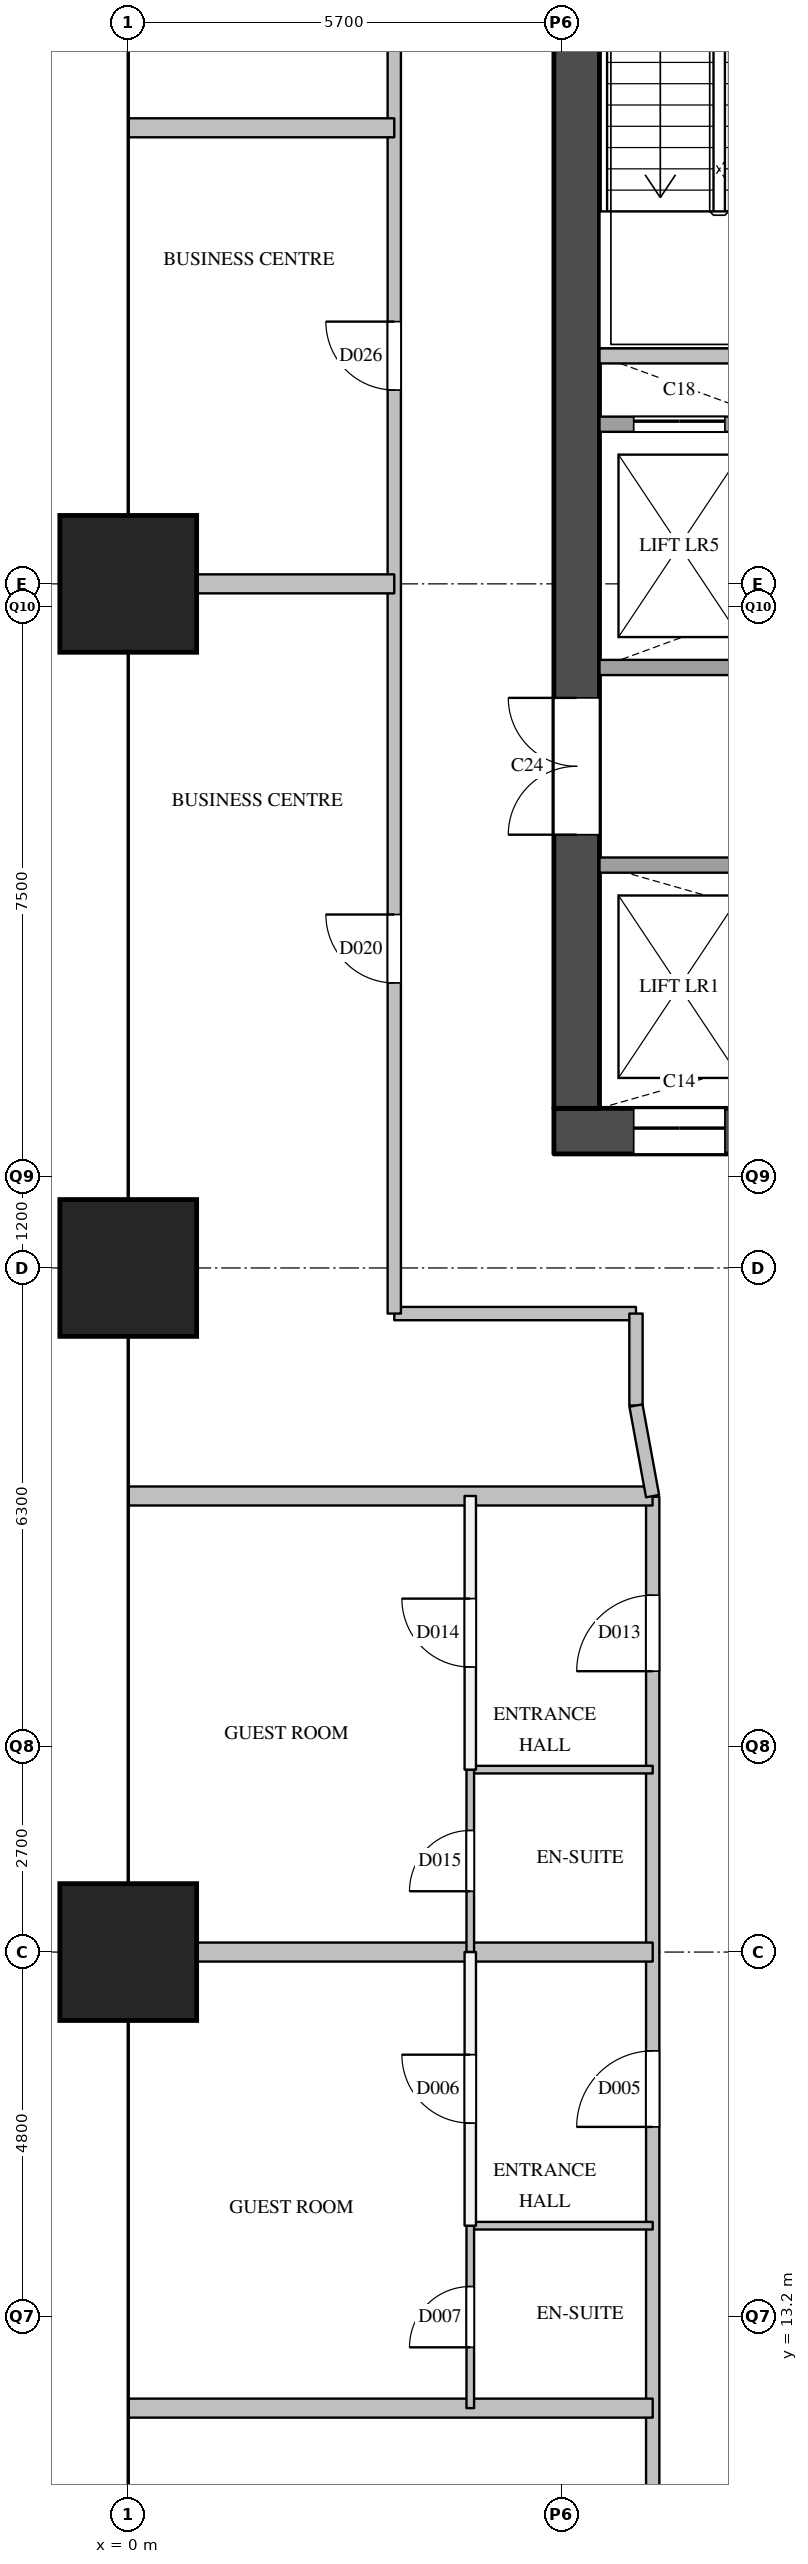
"""IFC4 building model, lengths in metres.
Left out: names, types, materials, properties, quantities, classifications, styles, units other than length and angle.
Written with IfcOpenShell. Run it as: python <this file> out.ifc"""

import sys

from ifc_helpers import new_model, si_unit, direction, frame, frame_2d, origin, origin_2d, place, context, subcontext, project, spatial, rectangle, extrude, element, fill, save


model = new_model("IFC4")
c1 = context("Model", 3, precision=1e-05, world=origin(), true_north=direction((0.0, 1.0)))
c2 = subcontext(c1, "Body", "Model", "MODEL_VIEW")
j1 = project(units=[si_unit("LENGTHUNIT", "METRE"), si_unit("PLANEANGLEUNIT", "RADIAN")], contexts=[c1])
p1 = place(None, origin())
s1 = spatial("IfcSite", under=j1, at=p1, CompositionType="ELEMENT")
p2 = place(p1, origin())
s2 = spatial("IfcBuilding", under=s1, at=p2, CompositionType="ELEMENT")
p3 = place(p2, frame((0.0, 0.0, 46.2)))
s3 = spatial("IfcBuildingStorey", under=s2, at=p3, CompositionType="ELEMENT", Elevation=46.2)
for number, where, z_axis, x_axis in (
    (1, (0.0, 18.0, 0.0), (0.0, 0.0, 1.0), (1.0, 0.0, 0.0)),
    (2, (0.0, 27.0, 0.0), (0.0, 0.0, 1.0), (1.0, 0.0, 0.0)),
    (3, (0.0, 36.0, 0.0), (0.0, 0.0, 1.0), (1.0, 0.0, 0.0)),
):
    element("IfcColumn", number, at=place(p3, frame(where, z_axis=z_axis, x_axis=x_axis)), inside=s3, PredefinedType="COLUMN", context=c2, shape_type="SweptSolid", body=[
        extrude(rectangle(XDim=1.8, YDim=1.8, at=origin_2d()), origin(), (0.0, 0.0, 1.0), 3.8),
    ])
p4 = place(p3, frame((5.6, 28.8, 0.0), z_axis=(0.0, 0.0, 1.0), x_axis=(1.0, 0.0, 0.0)))
e4 = element("IfcWall", 4, at=p4, inside=s3, PredefinedType="SHEAR", context=c2, shape_type="SweptSolid", body=[
    extrude(rectangle(XDim=12.4, YDim=0.6, at=frame_2d((6.2, 0.0))), origin(), (0.0, 0.0, 1.0), 3.5),
])
p5 = place(p4, frame((1.05, 0.0, 0.0)))
e5 = element("IfcOpeningElement", 5, at=p5, cuts=e4, PredefinedType="OPENING", context=c2, shape_type="SweptSolid", body=[
    extrude(rectangle(XDim=1.2, YDim=2.1, at=frame_2d((0.6, 1.05))), frame((0.0, 0.31, 0.0), z_axis=(0.0, -1.0, 0.0), x_axis=(1.0, 0.0, 0.0)), (0.0, 0.0, 1.0), 0.62),
])
p6 = place(p4, frame((5.25, 0.0, 0.0)))
e6 = element("IfcOpeningElement", 6, at=p6, cuts=e4, PredefinedType="OPENING", context=c2, shape_type="SweptSolid", body=[
    extrude(rectangle(XDim=1.2, YDim=2.1, at=frame_2d((0.6, 1.05))), frame((0.0, 0.31, 0.0), z_axis=(0.0, -1.0, 0.0), x_axis=(1.0, 0.0, 0.0)), (0.0, 0.0, 1.0), 0.62),
])
p7 = place(p4, frame((7.35, 0.0, 0.0)))
e7 = element("IfcOpeningElement", 7, at=p7, cuts=e4, PredefinedType="OPENING", context=c2, shape_type="SweptSolid", body=[
    extrude(rectangle(XDim=1.2, YDim=2.1, at=frame_2d((0.6, 1.05))), frame((0.0, 0.31, 0.0), z_axis=(0.0, -1.0, 0.0), x_axis=(1.0, 0.0, 0.0)), (0.0, 0.0, 1.0), 0.62),
])
p8 = place(p3, frame((5.9, 29.1, 0.0), z_axis=(0.0, 0.0, 1.0), x_axis=(0.0, 1.0, 0.0)))
e8 = element("IfcWall", 8, at=p8, inside=s3, PredefinedType="SHEAR", context=c2, shape_type="SweptSolid", body=[
    extrude(rectangle(XDim=20.3, YDim=0.6, at=frame_2d((10.15, 0.0))), origin(), (0.0, 0.0, 1.0), 3.5),
])
p9 = place(p8, frame((3.6, 0.0, 0.0)))
e9 = element("IfcOpeningElement", 9, at=p9, cuts=e8, PredefinedType="OPENING", context=c2, shape_type="SweptSolid", body=[
    extrude(rectangle(XDim=1.8, YDim=2.1, at=frame_2d((0.9, 1.05))), frame((0.0, 0.31, 0.0), z_axis=(0.0, -1.0, 0.0), x_axis=(1.0, 0.0, 0.0)), (0.0, 0.0, 1.0), 0.62),
])
p10 = place(p8, frame((16.4, 0.0, 0.0)))
e10 = element("IfcOpeningElement", 10, at=p10, cuts=e8, PredefinedType="OPENING", context=c2, shape_type="SweptSolid", body=[
    extrude(rectangle(XDim=1.0, YDim=2.1, at=frame_2d((0.5, 1.05))), frame((0.0, 0.31, 0.0), z_axis=(0.0, -1.0, 0.0), x_axis=(1.0, 0.0, 0.0)), (0.0, 0.0, 1.0), 0.62),
])
p11 = place(p3, frame((6.2, 32.3, 0.0), z_axis=(0.0, 0.0, 1.0), x_axis=(1.0, 0.0, 0.0)))
e11 = element("IfcWall", 11, at=p11, inside=s3, PredefinedType="SOLIDWALL", context=c2, shape_type="SweptSolid", body=[
    extrude(rectangle(XDim=11.2, YDim=0.2, at=frame_2d((5.6, 0.0))), origin(), (0.0, 0.0, 1.0), 3.5),
])
p12 = place(p11, frame((2.55, 0.0, 0.0)))
e12 = element("IfcOpeningElement", 12, at=p12, cuts=e11, PredefinedType="OPENING", context=c2, shape_type="SweptSolid", body=[
    extrude(rectangle(XDim=1.2, YDim=2.1, at=frame_2d((0.6, 1.05))), frame((0.0, 0.11, 0.0), z_axis=(0.0, -1.0, 0.0), x_axis=(1.0, 0.0, 0.0)), (0.0, 0.0, 1.0), 0.22),
])
p13 = place(p3, frame((6.2, 34.9, 0.0), z_axis=(0.0, 0.0, 1.0), x_axis=(1.0, 0.0, 0.0)))
e13 = element("IfcWall", 13, at=p13, inside=s3, PredefinedType="SOLIDWALL", context=c2, shape_type="SweptSolid", body=[
    extrude(rectangle(XDim=11.2, YDim=0.2, at=frame_2d((5.6, 0.0))), origin(), (0.0, 0.0, 1.0), 3.5),
])
p14 = place(p3, frame((6.2, 38.1, 0.0), z_axis=(0.0, 0.0, 1.0), x_axis=(1.0, 0.0, 0.0)))
e14 = element("IfcWall", 14, at=p14, inside=s3, PredefinedType="SOLIDWALL", context=c2, shape_type="SweptSolid", body=[
    extrude(rectangle(XDim=11.2, YDim=0.2, at=frame_2d((5.6, 0.0))), origin(), (0.0, 0.0, 1.0), 3.5),
])
p15 = place(p14, frame((0.45, 0.0, 0.0)))
e15 = element("IfcOpeningElement", 15, at=p15, cuts=e14, PredefinedType="OPENING", context=c2, shape_type="SweptSolid", body=[
    extrude(rectangle(XDim=1.2, YDim=2.1, at=frame_2d((0.6, 1.05))), frame((0.0, 0.11, 0.0), z_axis=(0.0, -1.0, 0.0), x_axis=(1.0, 0.0, 0.0)), (0.0, 0.0, 1.0), 0.22),
])
p16 = place(p14, frame((2.55, 0.0, 0.0)))
e16 = element("IfcOpeningElement", 16, at=p16, cuts=e14, PredefinedType="OPENING", context=c2, shape_type="SweptSolid", body=[
    extrude(rectangle(XDim=1.2, YDim=2.1, at=frame_2d((0.6, 1.05))), frame((0.0, 0.11, 0.0), z_axis=(0.0, -1.0, 0.0), x_axis=(1.0, 0.0, 0.0)), (0.0, 0.0, 1.0), 0.22),
])
p17 = place(p14, frame((4.65, 0.0, 0.0)))
e17 = element("IfcOpeningElement", 17, at=p17, cuts=e14, PredefinedType="OPENING", context=c2, shape_type="SweptSolid", body=[
    extrude(rectangle(XDim=1.2, YDim=2.1, at=frame_2d((0.6, 1.05))), frame((0.0, 0.11, 0.0), z_axis=(0.0, -1.0, 0.0), x_axis=(1.0, 0.0, 0.0)), (0.0, 0.0, 1.0), 0.22),
])
p18 = place(p14, frame((6.75, 0.0, 0.0)))
e18 = element("IfcOpeningElement", 18, at=p18, cuts=e14, PredefinedType="OPENING", context=c2, shape_type="SweptSolid", body=[
    extrude(rectangle(XDim=1.2, YDim=2.1, at=frame_2d((0.6, 1.05))), frame((0.0, 0.11, 0.0), z_axis=(0.0, -1.0, 0.0), x_axis=(1.0, 0.0, 0.0)), (0.0, 0.0, 1.0), 0.22),
])
p19 = place(p3, frame((6.2, 39.0, 0.0), z_axis=(0.0, 0.0, 1.0), x_axis=(1.0, 0.0, 0.0)))
e19 = element("IfcWall", 19, at=p19, inside=s3, PredefinedType="SOLIDWALL", context=c2, shape_type="SweptSolid", body=[
    extrude(rectangle(XDim=3.05, YDim=0.2, at=frame_2d((1.525, 0.0))), origin(), (0.0, 0.0, 1.0), 3.5),
])
p20 = place(p3, frame((3.5, 26.4, 0.0), z_axis=(0.0, 0.0, 1.0), x_axis=(1.0, 0.0, 0.0)))
e20 = element("IfcWall", 20, at=p20, inside=s3, PredefinedType="PARTITIONING", context=c2, shape_type="SweptSolid", body=[
    extrude(rectangle(XDim=3.18, YDim=0.175, at=frame_2d((1.59, 0.0))), origin(), (0.0, 0.0, 1.0), 3.5),
])
p21 = place(p3, frame((3.5, 26.4, 0.0), z_axis=(0.0, 0.0, 1.0), x_axis=(0.0, 1.0, 0.0)))
e21 = element("IfcWall", 21, at=p21, inside=s3, PredefinedType="PARTITIONING", context=c2, shape_type="SweptSolid", body=[
    extrude(rectangle(XDim=25.7, YDim=0.175, at=frame_2d((12.85, 0.0))), origin(), (0.0, 0.0, 1.0), 2.5),
])
p22 = place(p21, frame((4.35, 0.0, 0.0)))
e22 = element("IfcOpeningElement", 22, at=p22, cuts=e21, PredefinedType="OPENING", context=c2, shape_type="SweptSolid", body=[
    extrude(rectangle(XDim=0.9, YDim=2.1, at=frame_2d((0.45, 1.05))), frame((0.0, 0.097, 0.0), z_axis=(0.0, -1.0, 0.0), x_axis=(1.0, 0.0, 0.0)), (0.0, 0.0, 1.0), 0.195),
])
p23 = place(p21, frame((12.15, 0.0, 0.0)))
e23 = element("IfcOpeningElement", 23, at=p23, cuts=e21, PredefinedType="OPENING", context=c2, shape_type="SweptSolid", body=[
    extrude(rectangle(XDim=0.9, YDim=2.1, at=frame_2d((0.45, 1.05))), frame((0.0, 0.097, 0.0), z_axis=(0.0, -1.0, 0.0), x_axis=(1.0, 0.0, 0.0)), (0.0, 0.0, 1.0), 0.195),
])
p24 = place(p21, frame((20.2, 0.0, 0.0)))
e24 = element("IfcOpeningElement", 24, at=p24, cuts=e21, PredefinedType="OPENING", context=c2, shape_type="SweptSolid", body=[
    extrude(rectangle(XDim=0.9, YDim=2.1, at=frame_2d((0.45, 1.05))), frame((0.0, 0.097, 0.0), z_axis=(0.0, -1.0, 0.0), x_axis=(1.0, 0.0, 0.0)), (0.0, 0.0, 1.0), 0.195),
])
p25 = place(p3, frame((6.68, 25.19, 0.0), z_axis=(0.0, 0.0, 1.0), x_axis=(0.0, 1.0, 0.0)))
e25 = element("IfcWall", 25, at=p25, inside=s3, PredefinedType="PARTITIONING", context=c2, shape_type="SweptSolid", body=[
    extrude(rectangle(XDim=1.21, YDim=0.175, at=frame_2d((0.605, 0.0))), origin(), (0.0, 0.0, 1.0), 3.5),
])
p26 = place(p3, frame((6.9, 6.9, 0.0), z_axis=(0.0, 0.0, 1.0), x_axis=(0.0, 1.0, 0.0)))
e26 = element("IfcWall", 26, at=p26, inside=s3, PredefinedType="PARTITIONING", context=c2, shape_type="SweptSolid", body=[
    extrude(rectangle(XDim=17.09, YDim=0.175, at=frame_2d((8.545, 0.0))), origin(), (0.0, 0.0, 1.0), 3.5),
])
p27 = place(p26, frame((8.8, 0.0, 0.0)))
e27 = element("IfcOpeningElement", 27, at=p27, cuts=e26, PredefinedType="OPENING", context=c2, shape_type="SweptSolid", body=[
    extrude(rectangle(XDim=1.0, YDim=2.1, at=frame_2d((0.5, 1.05))), frame((0.0, 0.097, 0.0), z_axis=(0.0, -1.0, 0.0), x_axis=(1.0, 0.0, 0.0)), (0.0, 0.0, 1.0), 0.195),
])
p28 = place(p26, frame((14.795, 0.0, 0.0)))
e28 = element("IfcOpeningElement", 28, at=p28, cuts=e26, PredefinedType="OPENING", context=c2, shape_type="SweptSolid", body=[
    extrude(rectangle(XDim=1.0, YDim=2.1, at=frame_2d((0.5, 1.05))), frame((0.0, 0.097, 0.0), z_axis=(0.0, -1.0, 0.0), x_axis=(1.0, 0.0, 0.0)), (0.0, 0.0, 1.0), 0.195),
])
p29 = place(p3, frame((4.5, 14.4, 0.0), z_axis=(0.0, 0.0, 1.0), x_axis=(0.0, 1.0, 0.0)))
e29 = element("IfcWall", 29, at=p29, inside=s3, PredefinedType="PARTITIONING", context=c2, shape_type="SweptSolid", body=[
    extrude(rectangle(XDim=3.6, YDim=0.15, at=frame_2d((1.8, 0.0))), origin(), (0.0, 0.0, 1.0), 3.5),
])
p30 = place(p29, frame((1.35, 0.0, 0.0)))
e30 = element("IfcOpeningElement", 30, at=p30, cuts=e29, PredefinedType="OPENING", context=c2, shape_type="SweptSolid", body=[
    extrude(rectangle(XDim=0.9, YDim=2.1, at=frame_2d((0.45, 1.05))), frame((0.0, 0.085, 0.0), z_axis=(0.0, -1.0, 0.0), x_axis=(1.0, 0.0, 0.0)), (0.0, 0.0, 1.0), 0.17),
])
p31 = place(p3, frame((4.5, 20.4, 0.0), z_axis=(0.0, 0.0, 1.0), x_axis=(0.0, 1.0, 0.0)))
e31 = element("IfcWall", 31, at=p31, inside=s3, PredefinedType="PARTITIONING", context=c2, shape_type="SweptSolid", body=[
    extrude(rectangle(XDim=3.6, YDim=0.15, at=frame_2d((1.8, 0.0))), origin(), (0.0, 0.0, 1.0), 3.5),
])
p32 = place(p31, frame((1.35, 0.0, 0.0)))
e32 = element("IfcOpeningElement", 32, at=p32, cuts=e31, PredefinedType="OPENING", context=c2, shape_type="SweptSolid", body=[
    extrude(rectangle(XDim=0.9, YDim=2.1, at=frame_2d((0.45, 1.05))), frame((0.0, 0.085, 0.0), z_axis=(0.0, -1.0, 0.0), x_axis=(1.0, 0.0, 0.0)), (0.0, 0.0, 1.0), 0.17),
])
p33 = place(p3, frame((0.0, 12.0, 0.0), z_axis=(0.0, 0.0, 1.0), x_axis=(1.0, 0.0, 0.0)))
e33 = element("IfcWall", 33, at=p33, inside=s3, PredefinedType="PARTITIONING", context=c2, shape_type="SweptSolid", body=[
    extrude(rectangle(XDim=6.9, YDim=0.25, at=frame_2d((3.45, 0.0))), origin(), (0.0, 0.0, 1.0), 2.5),
])
p34 = place(p3, frame((0.0, 18.0, 0.0), z_axis=(0.0, 0.0, 1.0), x_axis=(1.0, 0.0, 0.0)))
e34 = element("IfcWall", 34, at=p34, inside=s3, PredefinedType="PARTITIONING", context=c2, shape_type="SweptSolid", body=[
    extrude(rectangle(XDim=6.9, YDim=0.25, at=frame_2d((3.45, 0.0))), origin(), (0.0, 0.0, 1.0), 3.5),
])
p35 = place(p3, frame((0.0, 24.0, 0.0), z_axis=(0.0, 0.0, 1.0), x_axis=(1.0, 0.0, 0.0)))
e35 = element("IfcWall", 35, at=p35, inside=s3, PredefinedType="PARTITIONING", context=c2, shape_type="SweptSolid", body=[
    extrude(rectangle(XDim=6.898, YDim=0.25, at=frame_2d((3.449, 0.0))), origin(), (0.0, 0.0, 1.0), 2.5),
])
p36 = place(p3, frame((0.0, 36.0, 0.0), z_axis=(0.0, 0.0, 1.0), x_axis=(1.0, 0.0, 0.0)))
e36 = element("IfcWall", 36, at=p36, inside=s3, PredefinedType="PARTITIONING", context=c2, shape_type="SweptSolid", body=[
    extrude(rectangle(XDim=3.5, YDim=0.25, at=frame_2d((1.75, 0.0))), origin(), (0.0, 0.0, 1.0), 3.5),
])
p37 = place(p3, frame((0.0, 42.0, 0.0), z_axis=(0.0, 0.0, 1.0), x_axis=(1.0, 0.0, 0.0)))
e37 = element("IfcWall", 37, at=p37, inside=s3, PredefinedType="PARTITIONING", context=c2, shape_type="SweptSolid", body=[
    extrude(rectangle(XDim=3.5, YDim=0.25, at=frame_2d((1.75, 0.0))), origin(), (0.0, 0.0, 1.0), 2.5),
])
for number, where, z_axis, x_axis in (
    (38, (4.5, 14.4, 0.0), (0.0, 0.0, 1.0), (1.0, 0.0, 0.0)),
    (39, (4.5, 20.4, 0.0), (0.0, 0.0, 1.0), (1.0, 0.0, 0.0)),
):
    element("IfcWall", number, at=place(p3, frame(where, z_axis=z_axis, x_axis=x_axis)), inside=s3, PredefinedType="PARTITIONING", context=c2, shape_type="SweptSolid", body=[
        extrude(rectangle(XDim=2.4, YDim=0.1, at=frame_2d((1.2, 0.0))), origin(), (0.0, 0.0, 1.0), 3.5),
    ])
p38 = place(p3, frame((4.5, 12.0, 0.0), z_axis=(0.0, 0.0, 1.0), x_axis=(0.0, 1.0, 0.0)))
e40 = element("IfcWall", 40, at=p38, inside=s3, PredefinedType="PARTITIONING", context=c2, shape_type="SweptSolid", body=[
    extrude(rectangle(XDim=2.4, YDim=0.1, at=frame_2d((1.2, 0.0))), origin(), (0.0, 0.0, 1.0), 3.5),
])
p39 = place(p38, frame((0.8, 0.0, 0.0)))
e41 = element("IfcOpeningElement", 41, at=p39, cuts=e40, PredefinedType="OPENING", context=c2, shape_type="SweptSolid", body=[
    extrude(rectangle(XDim=0.8, YDim=2.1, at=frame_2d((0.4, 1.05))), frame((0.0, 0.06, 0.0), z_axis=(0.0, -1.0, 0.0), x_axis=(1.0, 0.0, 0.0)), (0.0, 0.0, 1.0), 0.12),
])
p40 = place(p3, frame((4.5, 18.0, 0.0), z_axis=(0.0, 0.0, 1.0), x_axis=(0.0, 1.0, 0.0)))
e42 = element("IfcWall", 42, at=p40, inside=s3, PredefinedType="PARTITIONING", context=c2, shape_type="SweptSolid", body=[
    extrude(rectangle(XDim=2.4, YDim=0.1, at=frame_2d((1.2, 0.0))), origin(), (0.0, 0.0, 1.0), 3.5),
])
p41 = place(p40, frame((0.8, 0.0, 0.0)))
e43 = element("IfcOpeningElement", 43, at=p41, cuts=e42, PredefinedType="OPENING", context=c2, shape_type="SweptSolid", body=[
    extrude(rectangle(XDim=0.8, YDim=2.1, at=frame_2d((0.4, 1.05))), frame((0.0, 0.06, 0.0), z_axis=(0.0, -1.0, 0.0), x_axis=(1.0, 0.0, 0.0)), (0.0, 0.0, 1.0), 0.12),
])
p42 = place(p3, frame((6.898, 23.998, 0.0), z_axis=(0.0, 0.0, 1.0), x_axis=(-0.180321371357, 0.983607748562, 0.0)))
e44 = element("IfcWall", 44, at=p42, inside=s3, PredefinedType="PARTITIONING", context=c2, shape_type="SweptSolid", body=[
    extrude(rectangle(XDim=1.212, YDim=0.175, at=frame_2d((0.606, 0.0))), origin(), (0.0, 0.0, 1.0), 3.5),
])
p43 = place(p5, origin())
e45 = element("IfcDoor", 45, at=p43, inside=s3, OperationType="SLIDING_TO_LEFT", PredefinedType="DOOR", context=c2, shape_type="SweptSolid", body=[
    extrude(rectangle(XDim=1.2, YDim=2.1, at=frame_2d((0.6, 1.05))), frame((0.0, 0.025, 0.0), z_axis=(0.0, -1.0, 0.0), x_axis=(1.0, 0.0, 0.0)), (0.0, 0.0, 1.0), 0.05),
])
fill(e5, e45)
p44 = place(p15, origin())
e46 = element("IfcDoor", 46, at=p44, inside=s3, OperationType="SLIDING_TO_LEFT", PredefinedType="DOOR", context=c2, shape_type="SweptSolid", body=[
    extrude(rectangle(XDim=1.2, YDim=2.1, at=frame_2d((0.6, 1.05))), frame((0.0, 0.025, 0.0), z_axis=(0.0, -1.0, 0.0), x_axis=(1.0, 0.0, 0.0)), (0.0, 0.0, 1.0), 0.05),
])
fill(e15, e46)
p45 = place(p9, origin())
e47 = element("IfcDoor", 47, at=p45, inside=s3, OperationType="DOUBLE_DOOR_SINGLE_SWING", PredefinedType="DOOR", context=c2, shape_type="SweptSolid", body=[
    extrude(rectangle(XDim=1.8, YDim=2.1, at=frame_2d((0.9, 1.05))), frame((0.0, 0.025, 0.0), z_axis=(0.0, -1.0, 0.0), x_axis=(1.0, 0.0, 0.0)), (0.0, 0.0, 1.0), 0.05),
])
fill(e9, e47)
p46 = place(p27, origin())
e48 = element("IfcDoor", 48, at=p46, inside=s3, OperationType="SINGLE_SWING_LEFT", PredefinedType="DOOR", context=c2, shape_type="SweptSolid", body=[
    extrude(rectangle(XDim=1.0, YDim=2.1, at=frame_2d((0.5, 1.05))), frame((0.0, 0.025, 0.0), z_axis=(0.0, -1.0, 0.0), x_axis=(1.0, 0.0, 0.0)), (0.0, 0.0, 1.0), 0.05),
])
fill(e27, e48)
p47 = place(p30, origin())
e49 = element("IfcDoor", 49, at=p47, inside=s3, OperationType="SINGLE_SWING_RIGHT", PredefinedType="DOOR", context=c2, shape_type="SweptSolid", body=[
    extrude(rectangle(XDim=0.9, YDim=2.1, at=frame_2d((0.45, 1.05))), frame((0.0, 0.025, 0.0), z_axis=(0.0, -1.0, 0.0), x_axis=(1.0, 0.0, 0.0)), (0.0, 0.0, 1.0), 0.05),
])
fill(e30, e49)
p48 = place(p39, origin())
e50 = element("IfcDoor", 50, at=p48, inside=s3, OperationType="SINGLE_SWING_LEFT", PredefinedType="DOOR", context=c2, shape_type="SweptSolid", body=[
    extrude(rectangle(XDim=0.8, YDim=2.1, at=frame_2d((0.4, 1.05))), frame((0.0, 0.025, 0.0), z_axis=(0.0, -1.0, 0.0), x_axis=(1.0, 0.0, 0.0)), (0.0, 0.0, 1.0), 0.05),
])
fill(e41, e50)
p49 = place(p28, origin())
e51 = element("IfcDoor", 51, at=p49, inside=s3, OperationType="SINGLE_SWING_LEFT", PredefinedType="DOOR", context=c2, shape_type="SweptSolid", body=[
    extrude(rectangle(XDim=1.0, YDim=2.1, at=frame_2d((0.5, 1.05))), frame((0.0, 0.025, 0.0), z_axis=(0.0, -1.0, 0.0), x_axis=(1.0, 0.0, 0.0)), (0.0, 0.0, 1.0), 0.05),
])
fill(e28, e51)
p50 = place(p32, origin())
e52 = element("IfcDoor", 52, at=p50, inside=s3, OperationType="SINGLE_SWING_RIGHT", PredefinedType="DOOR", context=c2, shape_type="SweptSolid", body=[
    extrude(rectangle(XDim=0.9, YDim=2.1, at=frame_2d((0.45, 1.05))), frame((0.0, 0.025, 0.0), z_axis=(0.0, -1.0, 0.0), x_axis=(1.0, 0.0, 0.0)), (0.0, 0.0, 1.0), 0.05),
])
fill(e32, e52)
p51 = place(p41, origin())
e53 = element("IfcDoor", 53, at=p51, inside=s3, OperationType="SINGLE_SWING_LEFT", PredefinedType="DOOR", context=c2, shape_type="SweptSolid", body=[
    extrude(rectangle(XDim=0.8, YDim=2.1, at=frame_2d((0.4, 1.05))), frame((0.0, 0.025, 0.0), z_axis=(0.0, -1.0, 0.0), x_axis=(1.0, 0.0, 0.0)), (0.0, 0.0, 1.0), 0.05),
])
fill(e43, e53)
p52 = place(p22, origin())
e54 = element("IfcDoor", 54, at=p52, inside=s3, OperationType="SINGLE_SWING_RIGHT", PredefinedType="DOOR", context=c2, shape_type="SweptSolid", body=[
    extrude(rectangle(XDim=0.9, YDim=2.1, at=frame_2d((0.45, 1.05))), frame((0.0, 0.025, 0.0), z_axis=(0.0, -1.0, 0.0), x_axis=(1.0, 0.0, 0.0)), (0.0, 0.0, 1.0), 0.05),
])
fill(e22, e54)
p53 = place(p23, origin())
e55 = element("IfcDoor", 55, at=p53, inside=s3, OperationType="SINGLE_SWING_RIGHT", PredefinedType="DOOR", context=c2, shape_type="SweptSolid", body=[
    extrude(rectangle(XDim=0.9, YDim=2.1, at=frame_2d((0.45, 1.05))), frame((0.0, 0.025, 0.0), z_axis=(0.0, -1.0, 0.0), x_axis=(1.0, 0.0, 0.0)), (0.0, 0.0, 1.0), 0.05),
])
fill(e23, e55)
save(model, sys.argv[1])
